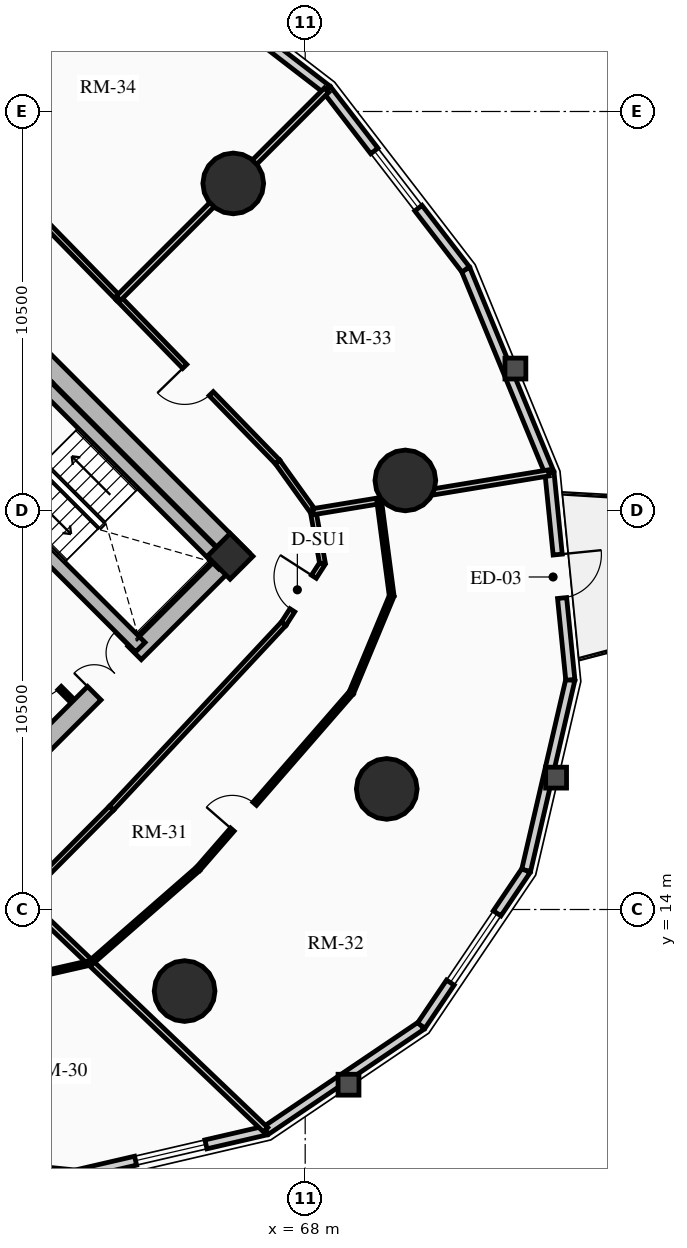
"""IFC4 building model, lengths in metres.
Left out: names, types, materials, properties, quantities, classifications, styles, units other than length and angle.
Written with IfcOpenShell. Run it as: python <this file> out.ifc"""

import sys

from ifc_helpers import new_model, si_unit, direction, frame, frame_2d, origin, origin_2d, place, context, subcontext, project, spatial, rectangle, circle, extrude, source, transform, mapped, element, fill, save


model = new_model("IFC4")
c1 = context("Model", 3, precision=1e-05, world=origin(), true_north=direction((0.0, 1.0)))
c2 = subcontext(c1, "Body", "Model", "MODEL_VIEW")
j1 = project(units=[si_unit("LENGTHUNIT", "METRE"), si_unit("PLANEANGLEUNIT", "RADIAN")], contexts=[c1])
p1 = place(None, origin())
s1 = spatial("IfcSite", under=j1, at=p1, CompositionType="ELEMENT")
p2 = place(p1, origin())
s2 = spatial("IfcBuilding", under=s1, at=p2, CompositionType="ELEMENT")
p3 = place(p2, frame((0.0, 0.0, 59.83)))
s3 = spatial("IfcBuildingStorey", under=s2, at=p3, CompositionType="ELEMENT", Elevation=59.83)
p4 = place(p3, frame((66.339, 23.227, 0.0), z_axis=(0.0, 0.0, 1.0), x_axis=(-0.707106781187, 0.707106781187, 0.0)))
e1 = element("IfcWall", 1, at=p4, inside=s3, PredefinedType="SHEAR", context=c2, shape_type="SweptSolid", body=[
    extrude(rectangle(XDim=14.3, YDim=0.5, at=frame_2d((7.15, 0.0))), origin(), (0.0, 0.0, 1.0), 2.91),
])
p5 = place(p3, frame((58.596, 15.838, 0.0), z_axis=(0.0, 0.0, 1.0), x_axis=(0.707106781187, 0.707106781187, 0.0)))
e2 = element("IfcWall", 2, at=p5, inside=s3, PredefinedType="SHEAR", context=c2, shape_type="SweptSolid", body=[
    extrude(rectangle(XDim=10.7, YDim=0.5, at=frame_2d((5.35, 0.0))), origin(), (0.0, 0.0, 1.0), 2.91),
])
m1 = source(origin(), c2, "Body", "SweptSolid", [
    extrude(rectangle(XDim=1.5, YDim=2.02, at=frame_2d((0.75, 1.01))), frame((0.0, 0.26, 0.0), z_axis=(0.0, -1.0, 0.0), x_axis=(1.0, 0.0, 0.0)), (0.0, 0.0, 1.0), 0.52),
])
p6 = place(p5, frame((5.45, 0.0, 0.0)))
e3 = element("IfcOpeningElement", 3, at=p6, cuts=e2, PredefinedType="OPENING", context=c2, shape_type="MappedRepresentation", body=[
    mapped(m1, transform((0.0, 0.0, 0.0), x_axis=(1.0, 0.0, 0.0), y_axis=(0.0, 1.0, 0.0), z_axis=(0.0, 0.0, 1.0), scale=1.0)),
])
p7 = place(p3, frame((63.662, 20.904, 0.0), z_axis=(0.0, 0.0, 1.0), x_axis=(-0.707106781187, 0.707106781187, 0.0)))
e4 = element("IfcWall", 4, at=p7, inside=s3, PredefinedType="SHEAR", context=c2, shape_type="SweptSolid", body=[
    extrude(rectangle(XDim=13.8, YDim=0.35, at=frame_2d((6.9, 0.0))), origin(), (0.0, 0.0, 1.0), 2.91),
])
m2 = source(origin(), c2, "Body", "SweptSolid", [
    extrude(rectangle(XDim=1.1, YDim=2.015, at=frame_2d((0.55, 1.007))), frame((0.0, 0.185, 0.0), z_axis=(0.0, -1.0, 0.0), x_axis=(1.0, 0.0, 0.0)), (0.0, 0.0, 1.0), 0.37),
])
p8 = place(p7, frame((10.025, 0.0, 0.0)))
e5 = element("IfcOpeningElement", 5, at=p8, cuts=e4, PredefinedType="OPENING", context=c2, shape_type="MappedRepresentation", body=[
    mapped(m2, transform((0.0, 0.0, 0.0), x_axis=(1.0, 0.0, 0.0), y_axis=(0.0, 1.0, 0.0), z_axis=(0.0, 0.0, 1.0), scale=1.0)),
])
p9 = place(p7, frame((12.025, 0.0, 0.0)))
e6 = element("IfcOpeningElement", 6, at=p9, cuts=e4, PredefinedType="OPENING", context=c2, shape_type="MappedRepresentation", body=[
    mapped(m2, transform((0.0, 0.0, 0.0), x_axis=(1.0, 0.0, 0.0), y_axis=(0.0, 1.0, 0.0), z_axis=(0.0, 0.0, 1.0), scale=1.0)),
])
m3 = source(origin(), c2, "Body", "SweptSolid", [
    extrude(rectangle(XDim=1.15, YDim=2.02, at=frame_2d((0.575, 1.01))), frame((0.0, 0.185, 0.0), z_axis=(0.0, -1.0, 0.0), x_axis=(1.0, 0.0, 0.0)), (0.0, 0.0, 1.0), 0.37),
])
p10 = place(p7, frame((5.33, 0.0, 0.0)))
e7 = element("IfcOpeningElement", 7, at=p10, cuts=e4, PredefinedType="OPENING", context=c2, shape_type="MappedRepresentation", body=[
    mapped(m3, transform((0.0, 0.0, 0.0), x_axis=(1.0, 0.0, 0.0), y_axis=(0.0, 1.0, 0.0), z_axis=(0.0, 0.0, 1.0), scale=1.0)),
])
p11 = place(p3, frame((65.847, 23.089, 0.0), z_axis=(0.0, 0.0, 1.0), x_axis=(-0.707106781187, 0.707106781187, 0.0)))
e8 = element("IfcWall", 8, at=p11, inside=s3, PredefinedType="SHEAR", context=c2, shape_type="SweptSolid", body=[
    extrude(rectangle(XDim=6.745, YDim=0.35, at=frame_2d((3.373, 0.0))), origin(), (0.0, 0.0, 1.0), 2.91),
])
p12 = place(p3, frame((66.024, 23.294, 0.0), z_axis=(0.0, 0.0, 1.0), x_axis=(0.707106781187, 0.707106781187, 0.0)))
e9 = element("IfcColumn", 9, at=p12, inside=s3, PredefinedType="COLUMN", context=c2, shape_type="SweptSolid", body=[
    extrude(rectangle(XDim=0.85, YDim=0.85, at=origin_2d()), origin(), (0.0, 0.0, 1.0), 2.91),
])
for number, where, z_axis, x_axis in (
    (10, (66.107, 33.107, 0.0), (0.0, 0.0, 1.0), (1.0, 0.0, 0.0)),
    (11, (64.827, 11.854, 0.0), (0.0, 0.0, 1.0), (1.0, 0.0, 0.0)),
    (12, (70.146, 17.173, 0.0), (0.0, 0.0, 1.0), (1.0, 0.0, 0.0)),
    (13, (70.635, 25.291, 0.0), (0.0, 0.0, 1.0), (1.0, 0.0, 0.0)),
):
    element("IfcColumn", number, at=place(p3, frame(where, z_axis=z_axis, x_axis=x_axis)), inside=s3, PredefinedType="USERDEFINED", context=c2, shape_type="SweptSolid", body=[
        extrude(circle(Radius=0.8, at=origin_2d()), origin(), (0.0, 0.0, 1.0), 2.91),
    ])
p13 = place(p3, frame((63.844, 39.222, 0.0), z_axis=(0.0, 0.0, 1.0), x_axis=(0.792014314407, -0.610502519057, 0.0)))
e14 = element("IfcWall", 14, at=p13, inside=s3, PredefinedType="SOLIDWALL", context=c2, shape_type="SweptSolid", body=[
    extrude(rectangle(XDim=5.973, YDim=0.24, at=frame_2d((2.987, 0.0))), origin(), (0.0, 0.0, 1.0), 2.073),
])
p14 = place(p3, frame((61.957, 7.024, 0.0), z_axis=(0.0, 0.0, 1.0), x_axis=(-0.994970765694, 0.100165739718, 0.0)))
e15 = element("IfcWall", 15, at=p14, inside=s3, PredefinedType="SOLIDWALL", context=c2, shape_type="SweptSolid", body=[
    extrude(rectangle(XDim=5.477, YDim=0.24, at=frame_2d((2.738, 0.0))), origin(), (0.0, 0.0, 1.0), 2.073),
])
m4 = source(origin(), c2, "Body", "SweptSolid", [
    extrude(rectangle(XDim=2.2, YDim=1.35, at=frame_2d((1.1, 0.675))), frame((0.0, 0.13, 0.0), z_axis=(0.0, -1.0, 0.0), x_axis=(1.0, 0.0, 0.0)), (0.0, 0.0, 1.0), 0.26),
])
p15 = place(p14, frame((1.638, 0.0, 0.65)))
e16 = element("IfcOpeningElement", 16, at=p15, cuts=e15, PredefinedType="OPENING", context=c2, shape_type="MappedRepresentation", body=[
    mapped(m4, transform((0.0, 0.0, 0.0), x_axis=(1.0, 0.0, 0.0), y_axis=(0.0, 1.0, 0.0), z_axis=(0.0, 0.0, 1.0), scale=1.0)),
])
p16 = place(p3, frame((66.969, 8.186, 0.0), z_axis=(0.0, 0.0, 1.0), x_axis=(-0.974166016949, -0.225833060959, 0.0)))
e17 = element("IfcWall", 17, at=p16, inside=s3, PredefinedType="SOLIDWALL", context=c2, shape_type="SweptSolid", body=[
    extrude(rectangle(XDim=5.146, YDim=0.24, at=frame_2d((2.573, 0.0))), origin(), (0.0, 0.0, 1.0), 2.073),
])
m5 = source(origin(), c2, "Body", "SweptSolid", [
    extrude(rectangle(XDim=1.9, YDim=1.35, at=frame_2d((0.95, 0.675))), frame((0.0, 0.13, 0.0), z_axis=(0.0, -1.0, 0.0), x_axis=(1.0, 0.0, 0.0)), (0.0, 0.0, 1.0), 0.26),
])
p17 = place(p16, frame((1.623, 0.0, 0.65)))
e18 = element("IfcOpeningElement", 18, at=p17, cuts=e17, PredefinedType="OPENING", context=c2, shape_type="MappedRepresentation", body=[
    mapped(m5, transform((0.0, 0.0, 0.0), x_axis=(1.0, 0.0, 0.0), y_axis=(0.0, 1.0, 0.0), z_axis=(0.0, 0.0, 1.0), scale=1.0)),
])
p18 = place(p3, frame((71.055, 10.945, 0.0), z_axis=(0.0, 0.0, 1.0), x_axis=(-0.828736708604, -0.559638693991, 0.0)))
e19 = element("IfcWall", 19, at=p18, inside=s3, PredefinedType="SOLIDWALL", context=c2, shape_type="SweptSolid", body=[
    extrude(rectangle(XDim=4.93, YDim=0.24, at=frame_2d((2.465, 0.0))), origin(), (0.0, 0.0, 1.0), 2.073),
])
p19 = place(p3, frame((73.814, 15.031, 0.0), z_axis=(0.0, 0.0, 1.0), x_axis=(-0.559638693991, -0.828736708604, 0.0)))
e20 = element("IfcWall", 20, at=p19, inside=s3, PredefinedType="SOLIDWALL", context=c2, shape_type="SweptSolid", body=[
    extrude(rectangle(XDim=4.93, YDim=0.24, at=frame_2d((2.465, 0.0))), origin(), (0.0, 0.0, 1.0), 2.073),
])
p20 = place(p19, frame((1.365, 0.0, 0.65)))
e21 = element("IfcOpeningElement", 21, at=p20, cuts=e20, PredefinedType="OPENING", context=c2, shape_type="MappedRepresentation", body=[
    mapped(m4, transform((0.0, 0.0, 0.0), x_axis=(1.0, 0.0, 0.0), y_axis=(0.0, 1.0, 0.0), z_axis=(0.0, 0.0, 1.0), scale=1.0)),
])
p21 = place(p3, frame((74.976, 20.043, 0.0), z_axis=(0.0, 0.0, 1.0), x_axis=(-0.225833060959, -0.974166016949, 0.0)))
e22 = element("IfcWall", 22, at=p21, inside=s3, PredefinedType="SOLIDWALL", context=c2, shape_type="SweptSolid", body=[
    extrude(rectangle(XDim=5.146, YDim=0.24, at=frame_2d((2.573, 0.0))), origin(), (0.0, 0.0, 1.0), 2.073),
])
p22 = place(p3, frame((74.428, 25.493, 0.0), z_axis=(0.0, 0.0, 1.0), x_axis=(0.100165739718, -0.994970765694, 0.0)))
e23 = element("IfcWall", 23, at=p22, inside=s3, PredefinedType="SOLIDWALL", context=c2, shape_type="SweptSolid", body=[
    extrude(rectangle(XDim=5.477, YDim=0.24, at=frame_2d((2.738, 0.0))), origin(), (0.0, 0.0, 1.0), 2.073),
])
m6 = source(origin(), c2, "Body", "SweptSolid", [
    extrude(rectangle(XDim=1.15, YDim=2.005, at=frame_2d((0.575, 1.002))), frame((0.0, 0.13, 0.0), z_axis=(0.0, -1.0, 0.0), x_axis=(1.0, 0.0, 0.0)), (0.0, 0.0, 1.0), 0.26),
])
p23 = place(p22, frame((2.163, 0.0, 0.0)))
e24 = element("IfcOpeningElement", 24, at=p23, cuts=e23, PredefinedType="OPENING", context=c2, shape_type="MappedRepresentation", body=[
    mapped(m6, transform((0.0, 0.0, 0.0), x_axis=(1.0, 0.0, 0.0), y_axis=(0.0, 1.0, 0.0), z_axis=(0.0, 0.0, 1.0), scale=1.0)),
])
p24 = place(p3, frame((72.222, 30.844, 0.0), z_axis=(0.0, 0.0, 1.0), x_axis=(0.381027682565, -0.924563629567, 0.0)))
e25 = element("IfcWall", 25, at=p24, inside=s3, PredefinedType="SOLIDWALL", context=c2, shape_type="SweptSolid", body=[
    extrude(rectangle(XDim=5.789, YDim=0.24, at=frame_2d((2.894, 0.0))), origin(), (0.0, 0.0, 1.0), 2.073),
])
p25 = place(p3, frame((68.575, 35.575, 0.0), z_axis=(0.0, 0.0, 1.0), x_axis=(0.610502519057, -0.792014314407, 0.0)))
e26 = element("IfcWall", 26, at=p25, inside=s3, PredefinedType="SOLIDWALL", context=c2, shape_type="SweptSolid", body=[
    extrude(rectangle(XDim=5.973, YDim=0.24, at=frame_2d((2.987, 0.0))), origin(), (0.0, 0.0, 1.0), 2.073),
])
p26 = place(p25, frame((2.037, 0.0, 0.65)))
e27 = element("IfcOpeningElement", 27, at=p26, cuts=e26, PredefinedType="OPENING", context=c2, shape_type="MappedRepresentation", body=[
    mapped(m5, transform((0.0, 0.0, 0.0), x_axis=(1.0, 0.0, 0.0), y_axis=(0.0, 1.0, 0.0), z_axis=(0.0, 0.0, 1.0), scale=1.0)),
])
p27 = place(p3, frame((61.835, 19.529, 0.0), z_axis=(0.0, 0.0, 1.0), x_axis=(-0.707174592913, 0.707038962956, 0.0)))
e28 = element("IfcWall", 28, at=p27, inside=s3, PredefinedType="PARTITIONING", context=c2, shape_type="SweptSolid", body=[
    extrude(rectangle(XDim=1.8, YDim=0.125, at=frame_2d((0.9, 0.0))), origin(), (0.0, 0.0, 1.0), 2.635),
])
m7 = source(origin(), c2, "Body", "SweptSolid", [
    extrude(rectangle(XDim=0.9, YDim=2.005, at=frame_2d((0.45, 1.002))), frame((0.0, 0.073, 0.0), z_axis=(0.0, -1.0, 0.0), x_axis=(1.0, 0.0, 0.0)), (0.0, 0.0, 1.0), 0.145),
])
p28 = place(p27, frame((0.42, 0.0, 0.0)))
e29 = element("IfcOpeningElement", 29, at=p28, cuts=e28, PredefinedType="OPENING", context=c2, shape_type="MappedRepresentation", body=[
    mapped(m7, transform((0.0, 0.0, 0.0), x_axis=(1.0, 0.0, 0.0), y_axis=(0.0, 1.0, 0.0), z_axis=(0.0, 0.0, 1.0), scale=1.0)),
])
p29 = place(p3, frame((63.086, 30.086, 0.0), z_axis=(0.0, 0.0, 1.0), x_axis=(-0.699075897379, 0.715047473741, 0.0)))
e30 = element("IfcWall", 30, at=p29, inside=s3, PredefinedType="PARTITIONING", context=c2, shape_type="SweptSolid", body=[
    extrude(rectangle(XDim=6.114, YDim=0.15, at=frame_2d((3.057, 0.0))), origin(), (0.0, 0.0, 1.0), 2.159),
])
p30 = place(p3, frame((60.562, 14.31, 0.0), z_axis=(0.0, 0.0, 1.0), x_axis=(0.704566236161, 0.709638230975, 0.0)))
e31 = element("IfcWall", 31, at=p30, inside=s3, PredefinedType="PARTITIONING", context=c2, shape_type="SweptSolid", body=[
    extrude(rectangle(XDim=3.321, YDim=0.15, at=frame_2d((1.661, 0.0))), origin(), (0.0, 0.0, 1.0), 2.159),
])
p31 = place(p3, frame((62.903, 16.667, 0.0), z_axis=(0.0, 0.0, 1.0), x_axis=(0.682371947497, 0.731005147225, 0.0)))
e32 = element("IfcWall", 32, at=p31, inside=s3, PredefinedType="PARTITIONING", context=c2, shape_type="SweptSolid", body=[
    extrude(rectangle(XDim=6.642, YDim=0.15, at=frame_2d((3.321, 0.0))), origin(), (0.0, 0.0, 1.0), 2.159),
])
p32 = place(p3, frame((67.435, 21.521, 0.0), z_axis=(0.0, 0.0, 1.0), x_axis=(0.540777197838, 0.841165870859, 0.0)))
e33 = element("IfcWall", 33, at=p32, inside=s3, PredefinedType="PARTITIONING", context=c2, shape_type="SweptSolid", body=[
    extrude(rectangle(XDim=1.888, YDim=0.15, at=frame_2d((0.944, 0.0))), origin(), (0.0, 0.0, 1.0), 2.205),
])
m8 = source(origin(), c2, "Body", "SweptSolid", [
    extrude(rectangle(XDim=1.05, YDim=2.015, at=frame_2d((0.525, 1.007))), frame((0.0, 0.085, 0.0), z_axis=(0.0, -1.0, 0.0), x_axis=(1.0, 0.0, 0.0)), (0.0, 0.0, 1.0), 0.17),
])
p33 = place(p32, frame((0.419, 0.0, 0.0)))
e34 = element("IfcOpeningElement", 34, at=p33, cuts=e33, PredefinedType="OPENING", context=c2, shape_type="MappedRepresentation", body=[
    mapped(m8, transform((0.0, 0.0, 0.0), x_axis=(1.0, 0.0, 0.0), y_axis=(0.0, 1.0, 0.0), z_axis=(0.0, 0.0, 1.0), scale=1.0)),
])
p34 = place(p3, frame((68.456, 23.11, 0.0), z_axis=(0.0, 0.0, 1.0), x_axis=(-0.1772522795, 0.984165448191, 0.0)))
e35 = element("IfcWall", 35, at=p34, inside=s3, PredefinedType="PARTITIONING", context=c2, shape_type="SweptSolid", body=[
    extrude(rectangle(XDim=1.382, YDim=0.15, at=frame_2d((0.691, 0.0))), origin(), (0.0, 0.0, 1.0), 2.159),
])
p35 = place(p3, frame((68.211, 24.469, 0.0), z_axis=(0.0, 0.0, 1.0), x_axis=(-0.583012141368, 0.812463441034, 0.0)))
e36 = element("IfcWall", 36, at=p35, inside=s3, PredefinedType="PARTITIONING", context=c2, shape_type="SweptSolid", body=[
    extrude(rectangle(XDim=1.613, YDim=0.15, at=frame_2d((0.807, 0.0))), origin(), (0.0, 0.0, 1.0), 2.205),
])
p36 = place(p3, frame((67.27, 25.78, 0.0), z_axis=(0.0, 0.0, 1.0), x_axis=(-0.696847842907, 0.717218992942, 0.0)))
e37 = element("IfcWall", 37, at=p36, inside=s3, PredefinedType="PARTITIONING", context=c2, shape_type="SweptSolid", body=[
    extrude(rectangle(XDim=6.004, YDim=0.15, at=frame_2d((3.002, 0.0))), origin(), (0.0, 0.0, 1.0), 2.635),
])
m9 = source(origin(), c2, "Body", "SweptSolid", [
    extrude(rectangle(XDim=1.0, YDim=2.015, at=frame_2d((0.5, 1.007))), frame((0.0, 0.085, 0.0), z_axis=(0.0, -1.0, 0.0), x_axis=(1.0, 0.0, 0.0)), (0.0, 0.0, 1.0), 0.17),
])
p37 = place(p36, frame((2.502, 0.0, 0.0)))
e38 = element("IfcOpeningElement", 38, at=p37, cuts=e37, PredefinedType="OPENING", context=c2, shape_type="MappedRepresentation", body=[
    mapped(m9, transform((0.0, 0.0, 0.0), x_axis=(1.0, 0.0, 0.0), y_axis=(0.0, 1.0, 0.0), z_axis=(0.0, 0.0, 1.0), scale=1.0)),
])
p38 = place(p3, frame((63.086, 30.086, 0.0), z_axis=(0.0, 0.0, 1.0), x_axis=(0.707106781187, 0.707106781187, 0.0)))
e39 = element("IfcWall", 39, at=p38, inside=s3, PredefinedType="PARTITIONING", context=c2, shape_type="SweptSolid", body=[
    extrude(rectangle(XDim=7.743, YDim=0.16, at=frame_2d((3.872, 0.0))), origin(), (0.0, 0.0, 1.0), 2.073),
])
p39 = place(p3, frame((60.562, 14.31, 0.0), z_axis=(0.0, 0.0, 1.0), x_axis=(0.723408813637, -0.690419936236, 0.0)))
e40 = element("IfcWall", 40, at=p39, inside=s3, PredefinedType="PARTITIONING", context=c2, shape_type="SweptSolid", body=[
    extrude(rectangle(XDim=8.844, YDim=0.16, at=frame_2d((4.422, 0.0))), origin(), (0.0, 0.0, 1.0), 2.073),
])
p40 = place(p3, frame((68.211, 24.469, 0.0), z_axis=(0.0, 0.0, 1.0), x_axis=(0.986718695255, 0.162438346562, 0.0)))
e41 = element("IfcWall", 41, at=p40, inside=s3, PredefinedType="PARTITIONING", context=c2, shape_type="SweptSolid", body=[
    extrude(rectangle(XDim=6.281, YDim=0.16, at=frame_2d((3.141, 0.0))), origin(), (0.0, 0.0, 1.0), 2.073),
])
p41 = place(p3, frame((59.833, 12.025, 0.0), z_axis=(0.0, 0.0, 1.0), x_axis=(0.975011214108, 0.222155648959, 0.0)))
e42 = element("IfcWall", 42, at=p41, inside=s3, PredefinedType="PARTITIONING", context=c2, shape_type="SweptSolid", body=[
    extrude(rectangle(XDim=2.586, YDim=0.125, at=frame_2d((1.293, 0.0))), origin(), (0.0, 0.0, 1.0), 2.205),
])
p42 = place(p3, frame((62.354, 12.6, 0.0), z_axis=(0.0, 0.0, 1.0), x_axis=(0.75329750535, 0.657679913357, 0.0)))
e43 = element("IfcWall", 43, at=p42, inside=s3, PredefinedType="PARTITIONING", context=c2, shape_type="SweptSolid", body=[
    extrude(rectangle(XDim=3.753, YDim=0.125, at=frame_2d((1.877, 0.0))), origin(), (0.0, 0.0, 1.0), 2.159),
])
p43 = place(p3, frame((65.181, 15.068, 0.0), z_axis=(0.0, 0.0, 1.0), x_axis=(0.656272116637, 0.754524293131, 0.0)))
e44 = element("IfcWall", 44, at=p43, inside=s3, PredefinedType="PARTITIONING", context=c2, shape_type="SweptSolid", body=[
    extrude(rectangle(XDim=6.147, YDim=0.125, at=frame_2d((3.074, 0.0))), origin(), (0.0, 0.0, 1.0), 2.159),
])
p44 = place(p43, frame((1.372, 0.0, 0.0)))
e45 = element("IfcOpeningElement", 45, at=p44, cuts=e44, PredefinedType="OPENING", context=c2, shape_type="MappedRepresentation", body=[
    mapped(m7, transform((0.0, 0.0, 0.0), x_axis=(1.0, 0.0, 0.0), y_axis=(0.0, 1.0, 0.0), z_axis=(0.0, 0.0, 1.0), scale=1.0)),
])
p45 = place(p3, frame((69.216, 19.707, 0.0), z_axis=(0.0, 0.0, 1.0), x_axis=(0.384483341888, 0.923131929797, 0.0)))
e46 = element("IfcWall", 46, at=p45, inside=s3, PredefinedType="PARTITIONING", context=c2, shape_type="SweptSolid", body=[
    extrude(rectangle(XDim=2.757, YDim=0.125, at=frame_2d((1.378, 0.0))), origin(), (0.0, 0.0, 1.0), 2.205),
])
p46 = place(p3, frame((70.276, 22.252, 0.0), z_axis=(0.0, 0.0, 1.0), x_axis=(-0.130649633398, 0.991428602217, 0.0)))
e47 = element("IfcWall", 47, at=p46, inside=s3, PredefinedType="PARTITIONING", context=c2, shape_type="SweptSolid", body=[
    extrude(rectangle(XDim=2.525, YDim=0.125, at=frame_2d((1.262, 0.0))), origin(), (0.0, 0.0, 1.0), 2.073),
])
m10 = source(origin(), c2, "Body", "SweptSolid", [
    extrude(rectangle(XDim=1.9, YDim=1.35, at=frame_2d((0.95, 0.675))), frame((0.0, 0.03, 0.0), z_axis=(0.0, -1.0, 0.0), x_axis=(1.0, 0.0, 0.0)), (0.0, 0.0, 1.0), 0.06),
])
p47 = place(p17, origin())
e48 = element("IfcWindow", 48, at=p47, inside=s3, PartitioningType="DOUBLE_PANEL_VERTICAL", PredefinedType="WINDOW", context=c2, shape_type="MappedRepresentation", body=[
    mapped(m10, transform((0.0, 0.0, 0.0), x_axis=(1.0, 0.0, 0.0), y_axis=(0.0, 1.0, 0.0), z_axis=(0.0, 0.0, 1.0), scale=1.0)),
])
fill(e18, e48)
m11 = source(origin(), c2, "Body", "SweptSolid", [
    extrude(rectangle(XDim=2.2, YDim=1.35, at=frame_2d((1.1, 0.675))), frame((0.0, 0.03, 0.0), z_axis=(0.0, -1.0, 0.0), x_axis=(1.0, 0.0, 0.0)), (0.0, 0.0, 1.0), 0.06),
])
p48 = place(p20, origin())
e49 = element("IfcWindow", 49, at=p48, inside=s3, PartitioningType="DOUBLE_PANEL_VERTICAL", PredefinedType="WINDOW", context=c2, shape_type="MappedRepresentation", body=[
    mapped(m11, transform((0.0, 0.0, 0.0), x_axis=(1.0, 0.0, 0.0), y_axis=(0.0, 1.0, 0.0), z_axis=(0.0, 0.0, 1.0), scale=1.0)),
])
fill(e21, e49)
m12 = source(origin(), c2, "Body", "SweptSolid", [
    extrude(rectangle(XDim=1.15, YDim=2.005, at=frame_2d((0.575, 1.002))), frame((0.0, 0.025, 0.0), z_axis=(0.0, -1.0, 0.0), x_axis=(1.0, 0.0, 0.0)), (0.0, 0.0, 1.0), 0.05),
])
p49 = place(p23, origin())
e50 = element("IfcDoor", 50, at=p49, inside=s3, OperationType="SINGLE_SWING_LEFT", PredefinedType="DOOR", context=c2, shape_type="MappedRepresentation", body=[
    mapped(m12, transform((0.0, 0.0, 0.0), x_axis=(1.0, 0.0, 0.0), y_axis=(0.0, 1.0, 0.0), z_axis=(0.0, 0.0, 1.0), scale=1.0)),
])
fill(e24, e50)
p50 = place(p26, origin())
e51 = element("IfcWindow", 51, at=p50, inside=s3, PartitioningType="DOUBLE_PANEL_VERTICAL", PredefinedType="WINDOW", context=c2, shape_type="MappedRepresentation", body=[
    mapped(m10, transform((0.0, 0.0, 0.0), x_axis=(1.0, 0.0, 0.0), y_axis=(0.0, 1.0, 0.0), z_axis=(0.0, 0.0, 1.0), scale=1.0)),
])
fill(e27, e51)
m13 = source(origin(), c2, "Body", "SweptSolid", [
    extrude(rectangle(XDim=1.5, YDim=2.02, at=frame_2d((0.75, 1.01))), frame((0.0, 0.025, 0.0), z_axis=(0.0, -1.0, 0.0), x_axis=(1.0, 0.0, 0.0)), (0.0, 0.0, 1.0), 0.05),
])
p51 = place(p6, origin())
e52 = element("IfcDoor", 52, at=p51, inside=s3, OperationType="DOUBLE_DOOR_SINGLE_SWING", PredefinedType="DOOR", context=c2, shape_type="MappedRepresentation", body=[
    mapped(m13, transform((0.0, 0.0, 0.0), x_axis=(1.0, 0.0, 0.0), y_axis=(0.0, 1.0, 0.0), z_axis=(0.0, 0.0, 1.0), scale=1.0)),
])
fill(e3, e52)
m14 = source(origin(), c2, "Body", "SweptSolid", [
    extrude(rectangle(XDim=0.9, YDim=2.005, at=frame_2d((0.45, 1.002))), frame((0.0, 0.025, 0.0), z_axis=(0.0, -1.0, 0.0), x_axis=(1.0, 0.0, 0.0)), (0.0, 0.0, 1.0), 0.05),
])
p52 = place(p28, origin())
e53 = element("IfcDoor", 53, at=p52, inside=s3, OperationType="SINGLE_SWING_RIGHT", PredefinedType="DOOR", context=c2, shape_type="MappedRepresentation", body=[
    mapped(m14, transform((0.0, 0.0, 0.0), x_axis=(1.0, 0.0, 0.0), y_axis=(0.0, 1.0, 0.0), z_axis=(0.0, 0.0, 1.0), scale=1.0)),
])
fill(e29, e53)
m15 = source(origin(), c2, "Body", "SweptSolid", [
    extrude(rectangle(XDim=1.05, YDim=2.015, at=frame_2d((0.525, 1.007))), frame((0.0, 0.025, 0.0), z_axis=(0.0, -1.0, 0.0), x_axis=(1.0, 0.0, 0.0)), (0.0, 0.0, 1.0), 0.05),
])
p53 = place(p33, origin())
e54 = element("IfcDoor", 54, at=p53, inside=s3, OperationType="SINGLE_SWING_RIGHT", PredefinedType="DOOR", context=c2, shape_type="MappedRepresentation", body=[
    mapped(m15, transform((0.0, 0.0, 0.0), x_axis=(1.0, 0.0, 0.0), y_axis=(0.0, 1.0, 0.0), z_axis=(0.0, 0.0, 1.0), scale=1.0)),
])
fill(e34, e54)
p54 = place(p44, origin())
e55 = element("IfcDoor", 55, at=p54, inside=s3, OperationType="SINGLE_SWING_LEFT", PredefinedType="DOOR", context=c2, shape_type="MappedRepresentation", body=[
    mapped(m14, transform((0.0, 0.0, 0.0), x_axis=(1.0, 0.0, 0.0), y_axis=(0.0, 1.0, 0.0), z_axis=(0.0, 0.0, 1.0), scale=1.0)),
])
fill(e45, e55)
m16 = source(origin(), c2, "Body", "SweptSolid", [
    extrude(rectangle(XDim=1.0, YDim=2.015, at=frame_2d((0.5, 1.007))), frame((0.0, 0.025, 0.0), z_axis=(0.0, -1.0, 0.0), x_axis=(1.0, 0.0, 0.0)), (0.0, 0.0, 1.0), 0.05),
])
p55 = place(p37, origin())
e56 = element("IfcDoor", 56, at=p55, inside=s3, OperationType="SINGLE_SWING_RIGHT", PredefinedType="DOOR", context=c2, shape_type="MappedRepresentation", body=[
    mapped(m16, transform((0.0, 0.0, 0.0), x_axis=(1.0, 0.0, 0.0), y_axis=(0.0, 1.0, 0.0), z_axis=(0.0, 0.0, 1.0), scale=1.0)),
])
fill(e38, e56)
save(model, sys.argv[1])
